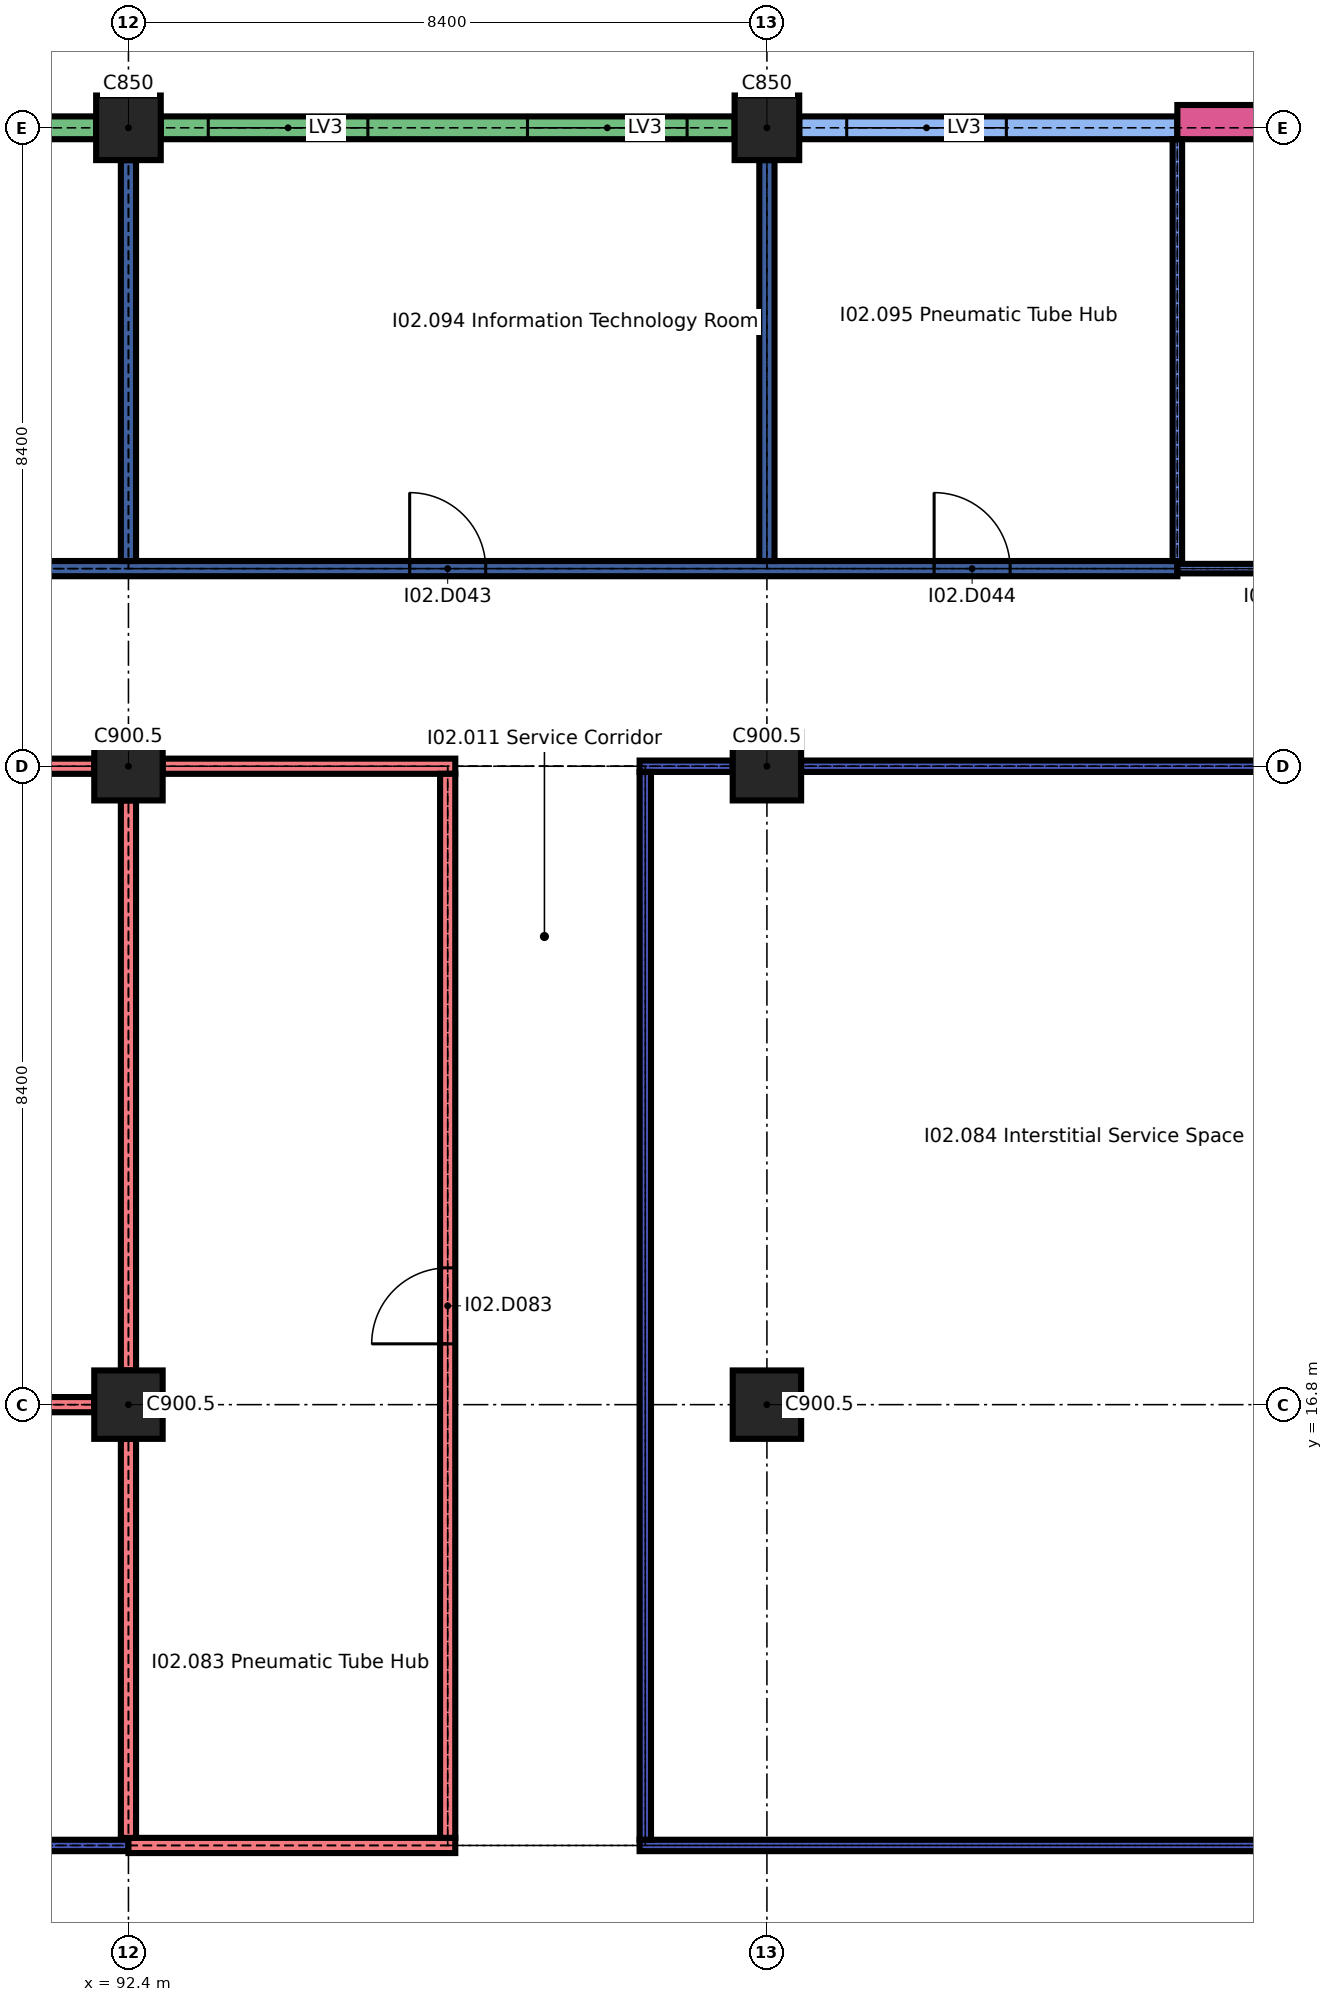
"""IFC4 building model, lengths in metres.
Left out: names, types, materials, properties, quantities, classifications, styles, units other than length and angle.
Written with IfcOpenShell. Run it as: python <this file> out.ifc"""

import sys

from ifc_helpers import new_model, si_unit, direction, frame, frame_2d, origin, origin_2d, place, context, subcontext, project, spatial, rectangle, extrude, element, fill, save


model = new_model("IFC4")
c1 = context("Model", 3, precision=1e-05, world=origin(), true_north=direction((0.0, 1.0)))
c2 = subcontext(c1, "Body", "Model", "MODEL_VIEW")
j1 = project(units=[si_unit("LENGTHUNIT", "METRE"), si_unit("PLANEANGLEUNIT", "RADIAN")], contexts=[c1])
p1 = place(None, origin())
s1 = spatial("IfcSite", under=j1, at=p1, CompositionType="ELEMENT")
p2 = place(p1, origin())
s2 = spatial("IfcBuilding", under=s1, at=p2, CompositionType="ELEMENT")
p3 = place(p2, frame((0.0, 0.0, 12.9)))
s3 = spatial("IfcBuildingStorey", under=s2, at=p3, CompositionType="ELEMENT", Elevation=12.9)
for number, where, z_axis, x_axis in (
    (1, (92.4, 16.8, 0.0), (0.0, 0.0, 1.0), (1.0, 0.0, 0.0)),
    (2, (100.8, 16.8, 0.0), (0.0, 0.0, 1.0), (1.0, 0.0, 0.0)),
    (3, (92.4, 25.2, 0.0), (0.0, 0.0, 1.0), (1.0, 0.0, 0.0)),
    (4, (100.8, 25.2, 0.0), (0.0, 0.0, 1.0), (1.0, 0.0, 0.0)),
):
    element("IfcColumn", number, at=place(p3, frame(where, z_axis=z_axis, x_axis=x_axis)), inside=s3, PredefinedType="COLUMN", context=c2, shape_type="SweptSolid", body=[
        extrude(rectangle(XDim=0.9, YDim=0.9, at=origin_2d()), origin(), (0.0, 0.0, 1.0), 2.04),
    ])
for number, where, z_axis, x_axis in (
    (5, (92.4, 33.6, 0.0), (0.0, 0.0, 1.0), (1.0, 0.0, 0.0)),
    (6, (100.8, 33.6, 0.0), (0.0, 0.0, 1.0), (1.0, 0.0, 0.0)),
):
    element("IfcColumn", number, at=place(p3, frame(where, z_axis=z_axis, x_axis=x_axis)), inside=s3, PredefinedType="COLUMN", context=c2, shape_type="SweptSolid", body=[
        extrude(rectangle(XDim=0.85, YDim=0.85, at=origin_2d()), origin(), (0.0, 0.0, 1.0), 2.04),
    ])
p4 = place(p3, frame((84.425, 33.6, 0.0), z_axis=(0.0, 0.0, 1.0), x_axis=(1.0, 0.0, 0.0)))
e7 = element("IfcWall", 7, at=p4, inside=s3, PredefinedType="SOLIDWALL", context=c2, shape_type="SweptSolid", body=[
    extrude(rectangle(XDim=7.55, YDim=0.3, at=frame_2d((3.775, 0.0))), origin(), (0.0, 0.0, 1.0), 1.74),
])
p5 = place(p4, frame((0.625, 0.0, 0.6)))
e8 = element("IfcOpeningElement", 8, at=p5, cuts=e7, PredefinedType="OPENING", context=c2, shape_type="SweptSolid", body=[
    extrude(rectangle(XDim=2.1, YDim=1.05, at=frame_2d((1.05, 0.525))), frame((0.0, 0.16, 0.0), z_axis=(0.0, -1.0, 0.0), x_axis=(1.0, 0.0, 0.0)), (0.0, 0.0, 1.0), 0.32),
])
p6 = place(p4, frame((4.825, 0.0, 0.6)))
e9 = element("IfcOpeningElement", 9, at=p6, cuts=e7, PredefinedType="OPENING", context=c2, shape_type="SweptSolid", body=[
    extrude(rectangle(XDim=2.1, YDim=1.05, at=frame_2d((1.05, 0.525))), frame((0.0, 0.16, 0.0), z_axis=(0.0, -1.0, 0.0), x_axis=(1.0, 0.0, 0.0)), (0.0, 0.0, 1.0), 0.32),
])
p7 = place(p3, frame((92.825, 33.6, 0.0), z_axis=(0.0, 0.0, 1.0), x_axis=(1.0, 0.0, 0.0)))
e10 = element("IfcWall", 10, at=p7, inside=s3, PredefinedType="SOLIDWALL", context=c2, shape_type="SweptSolid", body=[
    extrude(rectangle(XDim=7.55, YDim=0.3, at=frame_2d((3.775, 0.0))), origin(), (0.0, 0.0, 1.0), 1.74),
])
p8 = place(p7, frame((0.625, 0.0, 0.6)))
e11 = element("IfcOpeningElement", 11, at=p8, cuts=e10, PredefinedType="OPENING", context=c2, shape_type="SweptSolid", body=[
    extrude(rectangle(XDim=2.1, YDim=1.05, at=frame_2d((1.05, 0.525))), frame((0.0, 0.16, 0.0), z_axis=(0.0, -1.0, 0.0), x_axis=(1.0, 0.0, 0.0)), (0.0, 0.0, 1.0), 0.32),
])
p9 = place(p7, frame((4.825, 0.0, 0.6)))
e12 = element("IfcOpeningElement", 12, at=p9, cuts=e10, PredefinedType="OPENING", context=c2, shape_type="SweptSolid", body=[
    extrude(rectangle(XDim=2.1, YDim=1.05, at=frame_2d((1.05, 0.525))), frame((0.0, 0.16, 0.0), z_axis=(0.0, -1.0, 0.0), x_axis=(1.0, 0.0, 0.0)), (0.0, 0.0, 1.0), 0.32),
])
p10 = place(p3, frame((101.225, 33.6, 0.0), z_axis=(0.0, 0.0, 1.0), x_axis=(1.0, 0.0, 0.0)))
e13 = element("IfcWall", 13, at=p10, inside=s3, PredefinedType="SOLIDWALL", context=c2, shape_type="SweptSolid", body=[
    extrude(rectangle(XDim=4.975, YDim=0.3, at=frame_2d((2.487, 0.0))), origin(), (0.0, 0.0, 1.0), 2.1),
])
p11 = place(p10, frame((0.625, 0.0, 0.6)))
e14 = element("IfcOpeningElement", 14, at=p11, cuts=e13, PredefinedType="OPENING", context=c2, shape_type="SweptSolid", body=[
    extrude(rectangle(XDim=2.1, YDim=1.05, at=frame_2d((1.05, 0.525))), frame((0.0, 0.16, 0.0), z_axis=(0.0, -1.0, 0.0), x_axis=(1.0, 0.0, 0.0)), (0.0, 0.0, 1.0), 0.32),
])
p12 = place(p3, frame((106.2, 33.675, 0.0), z_axis=(0.0, 0.0, 1.0), x_axis=(1.0, 0.0, 0.0)))
e15 = element("IfcWall", 15, at=p12, inside=s3, PredefinedType="SOLIDWALL", context=c2, shape_type="SweptSolid", body=[
    extrude(rectangle(XDim=3.0, YDim=0.45, at=frame_2d((1.5, 0.0))), origin(), (0.0, 0.0, 1.0), 2.1),
])
p13 = place(p3, frame((56.525, 11.0, 0.0), z_axis=(0.0, 0.0, 1.0), x_axis=(1.0, 0.0, 0.0)))
e16 = element("IfcWall", 16, at=p13, inside=s3, PredefinedType="PARTITIONING", context=c2, shape_type="SweptSolid", body=[
    extrude(rectangle(XDim=35.875, YDim=0.15, at=frame_2d((17.938, 0.0))), origin(), (0.0, 0.0, 1.0), 2.04),
])
p14 = place(p13, frame((8.875, 0.0, 0.0)))
e17 = element("IfcOpeningElement", 17, at=p14, cuts=e16, PredefinedType="OPENING", context=c2, shape_type="SweptSolid", body=[
    extrude(rectangle(XDim=1.4, YDim=2.0, at=frame_2d((0.7, 1.0))), frame((0.0, 0.085, 0.0), z_axis=(0.0, -1.0, 0.0), x_axis=(1.0, 0.0, 0.0)), (0.0, 0.0, 1.0), 0.17),
])
p15 = place(p13, frame((26.775, 0.0, 0.0)))
e18 = element("IfcOpeningElement", 18, at=p15, cuts=e16, PredefinedType="OPENING", context=c2, shape_type="SweptSolid", body=[
    extrude(rectangle(XDim=1.4, YDim=2.0, at=frame_2d((0.7, 1.0))), frame((0.0, 0.085, 0.0), z_axis=(0.0, -1.0, 0.0), x_axis=(1.0, 0.0, 0.0)), (0.0, 0.0, 1.0), 0.17),
])
p16 = place(p3, frame((92.4, 11.0, 0.0), z_axis=(0.0, 0.0, 1.0), x_axis=(1.0, 0.0, 0.0)))
e19 = element("IfcWall", 19, at=p16, inside=s3, PredefinedType="SOLIDWALL", context=c2, shape_type="SweptSolid", body=[
    extrude(rectangle(XDim=4.3, YDim=0.2, at=frame_2d((2.15, 0.0))), origin(), (0.0, 0.0, 1.0), 2.04),
])
p17 = place(p3, frame((99.125, 11.0, 0.0), z_axis=(0.0, 0.0, 1.0), x_axis=(1.0, 0.0, 0.0)))
e20 = element("IfcWall", 20, at=p17, inside=s3, PredefinedType="PARTITIONING", context=c2, shape_type="SweptSolid", body=[
    extrude(rectangle(XDim=18.55, YDim=0.15, at=frame_2d((9.275, 0.0))), origin(), (0.0, 0.0, 1.0), 2.04),
])
p18 = place(p17, frame((8.575, 0.0, 0.0)))
e21 = element("IfcOpeningElement", 21, at=p18, cuts=e20, PredefinedType="OPENING", context=c2, shape_type="SweptSolid", body=[
    extrude(rectangle(XDim=1.4, YDim=2.0, at=frame_2d((0.7, 1.0))), frame((0.0, 0.085, 0.0), z_axis=(0.0, -1.0, 0.0), x_axis=(1.0, 0.0, 0.0)), (0.0, 0.0, 1.0), 0.17),
])
for number, where, z_axis, x_axis in (
    (22, (84.45, 16.8, 0.0), (0.0, 0.0, 1.0), (1.0, 0.0, 0.0)),
    (23, (84.45, 25.2, 0.0), (0.0, 0.0, 1.0), (1.0, 0.0, 0.0)),
):
    element("IfcWall", number, at=place(p3, frame(where, z_axis=z_axis, x_axis=x_axis)), inside=s3, PredefinedType="SOLIDWALL", context=c2, shape_type="SweptSolid", body=[
        extrude(rectangle(XDim=7.5, YDim=0.2, at=frame_2d((3.75, 0.0))), origin(), (0.0, 0.0, 1.0), 2.04),
    ])
p19 = place(p3, frame((92.85, 25.2, 0.0), z_axis=(0.0, 0.0, 1.0), x_axis=(1.0, 0.0, 0.0)))
e24 = element("IfcWall", 24, at=p19, inside=s3, PredefinedType="SOLIDWALL", context=c2, shape_type="SweptSolid", body=[
    extrude(rectangle(XDim=3.85, YDim=0.2, at=frame_2d((1.925, 0.0))), origin(), (0.0, 0.0, 1.0), 2.04),
])
p20 = place(p3, frame((99.125, 25.2, 0.0), z_axis=(0.0, 0.0, 1.0), x_axis=(1.0, 0.0, 0.0)))
e25 = element("IfcWall", 25, at=p20, inside=s3, PredefinedType="PARTITIONING", context=c2, shape_type="SweptSolid", body=[
    extrude(rectangle(XDim=1.225, YDim=0.15, at=frame_2d((0.613, 0.0))), origin(), (0.0, 0.0, 1.0), 2.04),
])
p21 = place(p3, frame((101.25, 25.2, 0.0), z_axis=(0.0, 0.0, 1.0), x_axis=(1.0, 0.0, 0.0)))
e26 = element("IfcWall", 26, at=p21, inside=s3, PredefinedType="PARTITIONING", context=c2, shape_type="SweptSolid", body=[
    extrude(rectangle(XDim=7.95, YDim=0.15, at=frame_2d((3.975, 0.0))), origin(), (0.0, 0.0, 1.0), 2.04),
])
p22 = place(p3, frame((42.1, 27.8, 0.0), z_axis=(0.0, 0.0, 1.0), x_axis=(1.0, 0.0, 0.0)))
e27 = element("IfcWall", 27, at=p22, inside=s3, PredefinedType="SOLIDWALL", context=c2, shape_type="SweptSolid", body=[
    extrude(rectangle(XDim=64.1, YDim=0.2, at=frame_2d((32.05, 0.0))), origin(), (0.0, 0.0, 1.0), 2.1),
])
p23 = place(p22, frame((5.55, 0.0, 0.0)))
e28 = element("IfcOpeningElement", 28, at=p23, cuts=e27, PredefinedType="OPENING", context=c2, shape_type="SweptSolid", body=[
    extrude(rectangle(XDim=1.4, YDim=2.0, at=frame_2d((0.7, 1.0))), frame((0.0, 0.11, 0.0), z_axis=(0.0, -1.0, 0.0), x_axis=(1.0, 0.0, 0.0)), (0.0, 0.0, 1.0), 0.22),
])
p24 = place(p22, frame((16.2, 0.0, 0.0)))
e29 = element("IfcOpeningElement", 29, at=p24, cuts=e27, PredefinedType="OPENING", context=c2, shape_type="SweptSolid", body=[
    extrude(rectangle(XDim=1.0, YDim=2.0, at=frame_2d((0.5, 1.0))), frame((0.0, 0.11, 0.0), z_axis=(0.0, -1.0, 0.0), x_axis=(1.0, 0.0, 0.0)), (0.0, 0.0, 1.0), 0.22),
])
p25 = place(p22, frame((24.6, 0.0, 0.0)))
e30 = element("IfcOpeningElement", 30, at=p25, cuts=e27, PredefinedType="OPENING", context=c2, shape_type="SweptSolid", body=[
    extrude(rectangle(XDim=1.0, YDim=2.0, at=frame_2d((0.5, 1.0))), frame((0.0, 0.11, 0.0), z_axis=(0.0, -1.0, 0.0), x_axis=(1.0, 0.0, 0.0)), (0.0, 0.0, 1.0), 0.22),
])
p26 = place(p22, frame((30.9, 0.0, 0.0)))
e31 = element("IfcOpeningElement", 31, at=p26, cuts=e27, PredefinedType="OPENING", context=c2, shape_type="SweptSolid", body=[
    extrude(rectangle(XDim=1.0, YDim=2.0, at=frame_2d((0.5, 1.0))), frame((0.0, 0.11, 0.0), z_axis=(0.0, -1.0, 0.0), x_axis=(1.0, 0.0, 0.0)), (0.0, 0.0, 1.0), 0.22),
])
p27 = place(p22, frame((41.2, 0.0, 0.0)))
e32 = element("IfcOpeningElement", 32, at=p27, cuts=e27, PredefinedType="OPENING", context=c2, shape_type="SweptSolid", body=[
    extrude(rectangle(XDim=1.4, YDim=2.0, at=frame_2d((0.7, 1.0))), frame((0.0, 0.11, 0.0), z_axis=(0.0, -1.0, 0.0), x_axis=(1.0, 0.0, 0.0)), (0.0, 0.0, 1.0), 0.22),
])
p28 = place(p22, frame((54.0, 0.0, 0.0)))
e33 = element("IfcOpeningElement", 33, at=p28, cuts=e27, PredefinedType="OPENING", context=c2, shape_type="SweptSolid", body=[
    extrude(rectangle(XDim=1.0, YDim=2.0, at=frame_2d((0.5, 1.0))), frame((0.0, 0.11, 0.0), z_axis=(0.0, -1.0, 0.0), x_axis=(1.0, 0.0, 0.0)), (0.0, 0.0, 1.0), 0.22),
])
p29 = place(p22, frame((60.9, 0.0, 0.0)))
e34 = element("IfcOpeningElement", 34, at=p29, cuts=e27, PredefinedType="OPENING", context=c2, shape_type="SweptSolid", body=[
    extrude(rectangle(XDim=1.0, YDim=2.0, at=frame_2d((0.5, 1.0))), frame((0.0, 0.11, 0.0), z_axis=(0.0, -1.0, 0.0), x_axis=(1.0, 0.0, 0.0)), (0.0, 0.0, 1.0), 0.22),
])
p30 = place(p3, frame((106.2, 27.8, 0.0), z_axis=(0.0, 0.0, 1.0), x_axis=(1.0, 0.0, 0.0)))
e35 = element("IfcWall", 35, at=p30, inside=s3, PredefinedType="SOLIDWALL", context=c2, shape_type="SweptSolid", body=[
    extrude(rectangle(XDim=2.9, YDim=0.125, at=frame_2d((1.45, 0.0))), origin(), (0.0, 0.0, 1.0), 2.1),
])
p31 = place(p30, frame((1.05, 0.0, 0.0)))
e36 = element("IfcOpeningElement", 36, at=p31, cuts=e35, PredefinedType="OPENING", context=c2, shape_type="SweptSolid", body=[
    extrude(rectangle(XDim=0.8, YDim=2.0, at=frame_2d((0.4, 1.0))), frame((0.0, 0.073, 0.0), z_axis=(0.0, -1.0, 0.0), x_axis=(1.0, 0.0, 0.0)), (0.0, 0.0, 1.0), 0.145),
])
p32 = place(p3, frame((92.4, 11.1, 0.0), z_axis=(0.0, 0.0, 1.0), x_axis=(0.0, 1.0, 0.0)))
e37 = element("IfcWall", 37, at=p32, inside=s3, PredefinedType="SOLIDWALL", context=c2, shape_type="SweptSolid", body=[
    extrude(rectangle(XDim=5.25, YDim=0.2, at=frame_2d((2.625, 0.0))), origin(), (0.0, 0.0, 1.0), 2.04),
])
p33 = place(p3, frame((92.4, 17.25, 0.0), z_axis=(0.0, 0.0, 1.0), x_axis=(0.0, 1.0, 0.0)))
e38 = element("IfcWall", 38, at=p33, inside=s3, PredefinedType="SOLIDWALL", context=c2, shape_type="SweptSolid", body=[
    extrude(rectangle(XDim=7.5, YDim=0.2, at=frame_2d((3.75, 0.0))), origin(), (0.0, 0.0, 1.0), 2.04),
])
p34 = place(p3, frame((92.4, 27.9, 0.0), z_axis=(0.0, 0.0, 1.0), x_axis=(0.0, 1.0, 0.0)))
e39 = element("IfcWall", 39, at=p34, inside=s3, PredefinedType="SOLIDWALL", context=c2, shape_type="SweptSolid", body=[
    extrude(rectangle(XDim=5.275, YDim=0.2, at=frame_2d((2.638, 0.0))), origin(), (0.0, 0.0, 1.0), 2.1),
])
p35 = place(p3, frame((96.6, 11.1, 0.0), z_axis=(0.0, 0.0, 1.0), x_axis=(0.0, 1.0, 0.0)))
e40 = element("IfcWall", 40, at=p35, inside=s3, PredefinedType="SOLIDWALL", context=c2, shape_type="SweptSolid", body=[
    extrude(rectangle(XDim=14.0, YDim=0.2, at=frame_2d((7.0, 0.0))), origin(), (0.0, 0.0, 1.0), 2.04),
])
p36 = place(p35, frame((6.5, 0.0, 0.0)))
e41 = element("IfcOpeningElement", 41, at=p36, cuts=e40, PredefinedType="OPENING", context=c2, shape_type="SweptSolid", body=[
    extrude(rectangle(XDim=1.0, YDim=2.0, at=frame_2d((0.5, 1.0))), frame((0.0, 0.11, 0.0), z_axis=(0.0, -1.0, 0.0), x_axis=(1.0, 0.0, 0.0)), (0.0, 0.0, 1.0), 0.22),
])
p37 = place(p3, frame((99.2, 11.075, 0.0), z_axis=(0.0, 0.0, 1.0), x_axis=(0.0, 1.0, 0.0)))
e42 = element("IfcWall", 42, at=p37, inside=s3, PredefinedType="PARTITIONING", context=c2, shape_type="SweptSolid", body=[
    extrude(rectangle(XDim=14.05, YDim=0.15, at=frame_2d((7.025, 0.0))), origin(), (0.0, 0.0, 1.0), 2.04),
])
p38 = place(p3, frame((100.8, 27.9, 0.0), z_axis=(0.0, 0.0, 1.0), x_axis=(0.0, 1.0, 0.0)))
e43 = element("IfcWall", 43, at=p38, inside=s3, PredefinedType="SOLIDWALL", context=c2, shape_type="SweptSolid", body=[
    extrude(rectangle(XDim=5.275, YDim=0.2, at=frame_2d((2.638, 0.0))), origin(), (0.0, 0.0, 1.0), 2.1),
])
p39 = place(p3, frame((106.2, 27.9, 0.0), z_axis=(0.0, 0.0, 1.0), x_axis=(0.0, 1.0, 0.0)))
e44 = element("IfcWall", 44, at=p39, inside=s3, PredefinedType="SOLIDWALL", context=c2, shape_type="SweptSolid", body=[
    extrude(rectangle(XDim=5.55, YDim=0.125, at=frame_2d((2.775, 0.0))), origin(), (0.0, 0.0, 1.0), 2.1),
])
p40 = place(p8, origin())
e45 = element("IfcWindow", 45, at=p40, inside=s3, PartitioningType="SINGLE_PANEL", PredefinedType="WINDOW", context=c2, shape_type="SweptSolid", body=[
    extrude(rectangle(XDim=2.1, YDim=1.05, at=frame_2d((1.05, 0.525))), frame((0.0, 0.075, 0.0), z_axis=(0.0, -1.0, 0.0), x_axis=(1.0, 0.0, 0.0)), (0.0, 0.0, 1.0), 0.15),
])
fill(e11, e45)
p41 = place(p9, origin())
e46 = element("IfcWindow", 46, at=p41, inside=s3, PartitioningType="SINGLE_PANEL", PredefinedType="WINDOW", context=c2, shape_type="SweptSolid", body=[
    extrude(rectangle(XDim=2.1, YDim=1.05, at=frame_2d((1.05, 0.525))), frame((0.0, 0.075, 0.0), z_axis=(0.0, -1.0, 0.0), x_axis=(1.0, 0.0, 0.0)), (0.0, 0.0, 1.0), 0.15),
])
fill(e12, e46)
p42 = place(p11, origin())
e47 = element("IfcWindow", 47, at=p42, inside=s3, PartitioningType="SINGLE_PANEL", PredefinedType="WINDOW", context=c2, shape_type="SweptSolid", body=[
    extrude(rectangle(XDim=2.1, YDim=1.05, at=frame_2d((1.05, 0.525))), frame((0.0, 0.075, 0.0), z_axis=(0.0, -1.0, 0.0), x_axis=(1.0, 0.0, 0.0)), (0.0, 0.0, 1.0), 0.15),
])
fill(e14, e47)
p43 = place(p28, origin())
e48 = element("IfcDoor", 48, at=p43, inside=s3, OperationType="SINGLE_SWING_RIGHT", PredefinedType="DOOR", context=c2, shape_type="SweptSolid", body=[
    extrude(rectangle(XDim=1.0, YDim=2.0, at=frame_2d((0.5, 1.0))), frame((0.0, 0.025, 0.0), z_axis=(0.0, -1.0, 0.0), x_axis=(1.0, 0.0, 0.0)), (0.0, 0.0, 1.0), 0.05),
])
fill(e33, e48)
p44 = place(p29, origin())
e49 = element("IfcDoor", 49, at=p44, inside=s3, OperationType="SINGLE_SWING_RIGHT", PredefinedType="DOOR", context=c2, shape_type="SweptSolid", body=[
    extrude(rectangle(XDim=1.0, YDim=2.0, at=frame_2d((0.5, 1.0))), frame((0.0, 0.025, 0.0), z_axis=(0.0, -1.0, 0.0), x_axis=(1.0, 0.0, 0.0)), (0.0, 0.0, 1.0), 0.05),
])
fill(e34, e49)
p45 = place(p36, origin())
e50 = element("IfcDoor", 50, at=p45, inside=s3, OperationType="SINGLE_SWING_RIGHT", PredefinedType="DOOR", context=c2, shape_type="SweptSolid", body=[
    extrude(rectangle(XDim=1.0, YDim=2.0, at=frame_2d((0.5, 1.0))), frame((0.0, 0.025, 0.0), z_axis=(0.0, -1.0, 0.0), x_axis=(1.0, 0.0, 0.0)), (0.0, 0.0, 1.0), 0.05),
])
fill(e41, e50)
save(model, sys.argv[1])
